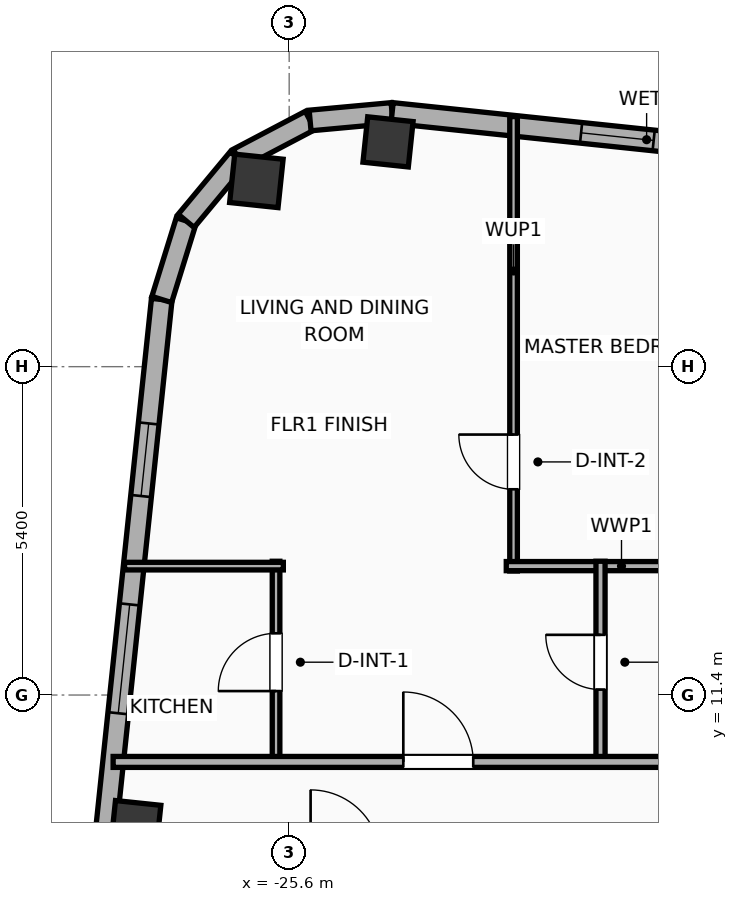
"""IFC4 building model, lengths in metres.
Left out: names, types, materials, properties, quantities, classifications, styles, units other than length and angle.
Written with IfcOpenShell. Run it as: python <this file> out.ifc"""

import sys

from ifc_helpers import new_model, si_unit, direction, frame, frame_2d, origin, origin_2d, place, context, subcontext, project, spatial, rectangle, hollow_rectangle, hollow_circle, extrude, element, fill, save


model = new_model("IFC4")
c1 = context("Model", 3, precision=1e-05, world=origin(), true_north=direction((0.0, 1.0)))
c2 = subcontext(c1, "Body", "Model", "MODEL_VIEW")
j1 = project(units=[si_unit("LENGTHUNIT", "METRE"), si_unit("PLANEANGLEUNIT", "RADIAN")], contexts=[c1])
p1 = place(None, origin())
s1 = spatial("IfcSite", under=j1, at=p1, CompositionType="ELEMENT")
p2 = place(p1, origin())
s2 = spatial("IfcBuilding", under=s1, at=p2, CompositionType="ELEMENT")
p3 = place(p2, frame((0.0, 0.0, 267.8)))
s3 = spatial("IfcBuildingStorey", under=s2, at=p3, CompositionType="ELEMENT", Elevation=267.8)
p4 = place(p3, frame((-23.975, 20.497, 0.0), z_axis=(0.0, 0.0, 1.0), x_axis=(0.994521895368, -0.104528463268, 0.0)))
e1 = element("IfcColumn", 1, at=p4, inside=s3, PredefinedType="COLUMN", context=c2, shape_type="SweptSolid", body=[
    extrude(hollow_rectangle(XDim=0.75, YDim=0.75, WallThickness=0.025, at=origin_2d()), origin(), (0.0, 0.0, 1.0), 3.9),
])
p5 = place(p3, frame((-26.139, 19.855, 0.0), z_axis=(0.0, 0.0, 1.0), x_axis=(0.994521895368, -0.104528463268, 0.0)))
e2 = element("IfcColumn", 2, at=p5, inside=s3, PredefinedType="COLUMN", context=c2, shape_type="SweptSolid", body=[
    extrude(hollow_circle(Radius=0.4, WallThickness=0.028, at=origin_2d()), origin(), (0.0, 0.0, 1.0), 3.9),
])
p6 = place(p3, frame((-28.123, 9.252, 0.0), z_axis=(0.0, 0.0, 1.0), x_axis=(0.994521895368, -0.104528463268, 0.0)))
e3 = element("IfcColumn", 3, at=p6, inside=s3, PredefinedType="COLUMN", context=c2, shape_type="SweptSolid", body=[
    extrude(hollow_rectangle(XDim=0.75, YDim=0.75, WallThickness=0.025, at=origin_2d()), origin(), (0.0, 0.0, 1.0), 3.9),
])
p7 = place(p3, frame((-30.87, -12.296, 0.0), z_axis=(0.0, 0.0, 1.0), x_axis=(0.104533282919, 0.994521388791, 0.0)))
e4 = element("IfcWall", 4, at=p7, inside=s3, PredefinedType="ELEMENTEDWALL", context=c2, shape_type="SweptSolid", body=[
    extrude(rectangle(XDim=30.366, YDim=0.34, at=frame_2d((15.183, 0.0))), origin(), (0.0, 0.0, 1.0), 3.65),
])
p8 = place(p7, frame((5.842, 0.0, 0.75)))
e5 = element("IfcOpeningElement", 5, at=p8, cuts=e4, PredefinedType="OPENING", context=c2, shape_type="SweptSolid", body=[
    extrude(rectangle(XDim=1.8, YDim=2.1, at=frame_2d((0.9, 1.05))), frame((0.0, 0.18, 0.0), z_axis=(0.0, -1.0, 0.0), x_axis=(1.0, 0.0, 0.0)), (0.0, 0.0, 1.0), 0.36),
])
p9 = place(p7, frame((23.525, 0.0, 0.75)))
e6 = element("IfcOpeningElement", 6, at=p9, cuts=e4, PredefinedType="OPENING", context=c2, shape_type="SweptSolid", body=[
    extrude(rectangle(XDim=1.8, YDim=2.1, at=frame_2d((0.9, 1.05))), frame((0.0, 0.18, 0.0), z_axis=(0.0, -1.0, 0.0), x_axis=(1.0, 0.0, 0.0)), (0.0, 0.0, 1.0), 0.36),
])
p10 = place(p7, frame((27.117, 0.0, 0.75)))
e7 = element("IfcOpeningElement", 7, at=p10, cuts=e4, PredefinedType="OPENING", context=c2, shape_type="SweptSolid", body=[
    extrude(rectangle(XDim=1.2, YDim=2.05, at=frame_2d((0.6, 1.025))), frame((0.0, 0.18, 0.0), z_axis=(0.0, -1.0, 0.0), x_axis=(1.0, 0.0, 0.0)), (0.0, 0.0, 1.0), 0.36),
])
p11 = place(p7, frame((16.235, 0.0, 0.75)))
e8 = element("IfcOpeningElement", 8, at=p11, cuts=e4, PredefinedType="OPENING", context=c2, shape_type="SweptSolid", body=[
    extrude(rectangle(XDim=1.2, YDim=2.05, at=frame_2d((0.6, 1.025))), frame((0.0, 0.18, 0.0), z_axis=(0.0, -1.0, 0.0), x_axis=(1.0, 0.0, 0.0)), (0.0, 0.0, 1.0), 0.36),
])
p12 = place(p3, frame((-27.696, 17.905, 0.0), z_axis=(0.0, 0.0, 1.0), x_axis=(0.296416228123, 0.955058856671, 0.0)))
e9 = element("IfcWall", 9, at=p12, inside=s3, PredefinedType="ELEMENTEDWALL", context=c2, shape_type="SweptSolid", body=[
    extrude(rectangle(XDim=1.354, YDim=0.34, at=frame_2d((0.677, 0.0))), origin(), (0.0, 0.0, 1.0), 3.65),
])
p13 = place(p3, frame((-27.294, 19.198, 0.0), z_axis=(0.0, 0.0, 1.0), x_axis=(0.639501603217, 0.768789762863, 0.0)))
e10 = element("IfcWall", 10, at=p13, inside=s3, PredefinedType="ELEMENTEDWALL", context=c2, shape_type="SweptSolid", body=[
    extrude(rectangle(XDim=1.337, YDim=0.34, at=frame_2d((0.668, 0.0))), origin(), (0.0, 0.0, 1.0), 3.65),
])
p14 = place(p3, frame((-26.439, 20.226, 0.0), z_axis=(0.0, 0.0, 1.0), x_axis=(0.884922182678, 0.465738908193, 0.0)))
e11 = element("IfcWall", 11, at=p14, inside=s3, PredefinedType="ELEMENTEDWALL", context=c2, shape_type="SweptSolid", body=[
    extrude(rectangle(XDim=1.337, YDim=0.34, at=frame_2d((0.668, 0.0))), origin(), (0.0, 0.0, 1.0), 3.65),
])
p15 = place(p3, frame((-25.256, 20.848, 0.0), z_axis=(0.0, 0.0, 1.0), x_axis=(0.995813013343, 0.091413579172, 0.0)))
e12 = element("IfcWall", 12, at=p15, inside=s3, PredefinedType="ELEMENTEDWALL", context=c2, shape_type="SweptSolid", body=[
    extrude(rectangle(XDim=1.354, YDim=0.34, at=frame_2d((0.677, 0.0))), origin(), (0.0, 0.0, 1.0), 3.65),
])
p16 = place(p3, frame((-23.908, 20.972, 0.0), z_axis=(0.0, 0.0, 1.0), x_axis=(0.994522285292, -0.104524753323, 0.0)))
e13 = element("IfcWall", 13, at=p16, inside=s3, PredefinedType="ELEMENTEDWALL", context=c2, shape_type="SweptSolid", body=[
    extrude(rectangle(XDim=8.418, YDim=0.34, at=frame_2d((4.209, 0.0))), origin(), (0.0, 0.0, 1.0), 3.65),
])
p17 = place(p16, frame((3.125, 0.0, 0.75)))
e14 = element("IfcOpeningElement", 14, at=p17, cuts=e13, PredefinedType="OPENING", context=c2, shape_type="SweptSolid", body=[
    extrude(rectangle(XDim=1.2, YDim=2.05, at=frame_2d((0.6, 1.025))), frame((0.0, 0.18, 0.0), z_axis=(0.0, -1.0, 0.0), x_axis=(1.0, 0.0, 0.0)), (0.0, 0.0, 1.0), 0.36),
])
p18 = place(p3, frame((-21.91, 13.44, 0.0), z_axis=(0.0, 0.0, 1.0), x_axis=(0.0, 1.0, 0.0)))
e15 = element("IfcWall", 15, at=p18, inside=s3, PredefinedType="PARTITIONING", context=c2, shape_type="SweptSolid", body=[
    extrude(rectangle(XDim=7.473, YDim=0.125, at=frame_2d((3.737, 0.0))), origin(), (0.0, 0.0, 1.0), 3.09),
])
p19 = place(p18, frame((1.344, 0.0, 0.0)))
e16 = element("IfcOpeningElement", 16, at=p19, cuts=e15, PredefinedType="OPENING", context=c2, shape_type="SweptSolid", body=[
    extrude(rectangle(XDim=0.9, YDim=2.05, at=frame_2d((0.45, 1.025))), frame((0.0, 0.073, 0.0), z_axis=(0.0, -1.0, 0.0), x_axis=(1.0, 0.0, 0.0)), (0.0, 0.0, 1.0), 0.145),
])
p20 = place(p3, frame((-22.03, 13.52, 0.0), z_axis=(0.0, 0.0, 1.0), x_axis=(1.0, 0.0, 0.0)))
e17 = element("IfcWall", 17, at=p20, inside=s3, PredefinedType="PLUMBINGWALL", context=c2, shape_type="SweptSolid", body=[
    extrude(rectangle(XDim=3.79, YDim=0.15, at=frame_2d((1.895, 0.0))), origin(), (0.0, 0.0, 1.0), 3.65),
])
p21 = place(p3, frame((-25.816, 10.28, 0.0), z_axis=(0.0, 0.0, 1.0), x_axis=(0.0, 1.0, 0.0)))
e18 = element("IfcWall", 18, at=p21, inside=s3, PredefinedType="PARTITIONING", context=c2, shape_type="SweptSolid", body=[
    extrude(rectangle(XDim=3.32, YDim=0.125, at=frame_2d((1.66, 0.0))), origin(), (0.0, 0.0, 1.0), 3.65),
])
p22 = place(p21, frame((1.185, 0.0, 0.0)))
e19 = element("IfcOpeningElement", 19, at=p22, cuts=e18, PredefinedType="OPENING", context=c2, shape_type="SweptSolid", body=[
    extrude(rectangle(XDim=0.95, YDim=2.05, at=frame_2d((0.475, 1.025))), frame((0.0, 0.073, 0.0), z_axis=(0.0, -1.0, 0.0), x_axis=(1.0, 0.0, 0.0)), (0.0, 0.0, 1.0), 0.145),
])
p23 = place(p3, frame((-28.308, 13.52, 0.0), z_axis=(0.0, 0.0, 1.0), x_axis=(1.0, 0.0, 0.0)))
e20 = element("IfcWall", 20, at=p23, inside=s3, PredefinedType="PARTITIONING", context=c2, shape_type="SweptSolid", body=[
    extrude(rectangle(XDim=2.612, YDim=0.125, at=frame_2d((1.306, 0.0))), origin(), (0.0, 0.0, 1.0), 3.65),
])
p24 = place(p3, frame((-20.48, 10.28, 0.0), z_axis=(0.0, 0.0, 1.0), x_axis=(0.0, 1.0, 0.0)))
e21 = element("IfcWall", 21, at=p24, inside=s3, PredefinedType="PLUMBINGWALL", context=c2, shape_type="SweptSolid", body=[
    extrude(rectangle(XDim=3.32, YDim=0.15, at=frame_2d((1.66, 0.0))), origin(), (0.0, 0.0, 1.0), 3.09),
])
p25 = place(p24, frame((1.21, 0.0, 0.0)))
e22 = element("IfcOpeningElement", 22, at=p25, cuts=e21, PredefinedType="OPENING", context=c2, shape_type="SweptSolid", body=[
    extrude(rectangle(XDim=0.9, YDim=2.05, at=frame_2d((0.45, 1.025))), frame((0.0, 0.085, 0.0), z_axis=(0.0, -1.0, 0.0), x_axis=(1.0, 0.0, 0.0)), (0.0, 0.0, 1.0), 0.17),
])
p26 = place(p3, frame((-28.495, 10.3, 0.0), z_axis=(0.0, 0.0, 1.0), x_axis=(1.0, 0.0, 0.0)))
e23 = element("IfcWall", 23, at=p26, inside=s3, PredefinedType="PARTITIONING", context=c2, shape_type="SweptSolid", body=[
    extrude(rectangle(XDim=53.956, YDim=0.18, at=frame_2d((26.978, 0.0))), origin(), (0.0, 0.0, 1.0), 3.65),
])
p27 = place(p26, frame((4.772, 0.0, 0.0)))
e24 = element("IfcOpeningElement", 24, at=p27, cuts=e23, PredefinedType="OPENING", context=c2, shape_type="SweptSolid", body=[
    extrude(rectangle(XDim=1.15, YDim=2.05, at=frame_2d((0.575, 1.025))), frame((0.0, 0.1, 0.0), z_axis=(0.0, -1.0, 0.0), x_axis=(1.0, 0.0, 0.0)), (0.0, 0.0, 1.0), 0.2),
])
p28 = place(p26, frame((13.185, 0.0, 0.0)))
e25 = element("IfcOpeningElement", 25, at=p28, cuts=e23, PredefinedType="OPENING", context=c2, shape_type="SweptSolid", body=[
    extrude(rectangle(XDim=0.9, YDim=2.05, at=frame_2d((0.45, 1.025))), frame((0.0, 0.1, 0.0), z_axis=(0.0, -1.0, 0.0), x_axis=(1.0, 0.0, 0.0)), (0.0, 0.0, 1.0), 0.2),
])
p29 = place(p26, frame((21.196, 0.0, 0.0)))
e26 = element("IfcOpeningElement", 26, at=p29, cuts=e23, PredefinedType="OPENING", context=c2, shape_type="SweptSolid", body=[
    extrude(rectangle(XDim=1.15, YDim=2.05, at=frame_2d((0.575, 1.025))), frame((0.0, 0.1, 0.0), z_axis=(0.0, -1.0, 0.0), x_axis=(1.0, 0.0, 0.0)), (0.0, 0.0, 1.0), 0.2),
])
p30 = place(p26, frame((28.194, 0.0, 0.0)))
e27 = element("IfcOpeningElement", 27, at=p30, cuts=e23, PredefinedType="OPENING", context=c2, shape_type="SweptSolid", body=[
    extrude(rectangle(XDim=1.15, YDim=2.05, at=frame_2d((0.575, 1.025))), frame((0.0, 0.1, 0.0), z_axis=(0.0, -1.0, 0.0), x_axis=(1.0, 0.0, 0.0)), (0.0, 0.0, 1.0), 0.2),
])
p31 = place(p26, frame((33.919, 0.0, 0.0)))
e28 = element("IfcOpeningElement", 28, at=p31, cuts=e23, PredefinedType="OPENING", context=c2, shape_type="SweptSolid", body=[
    extrude(rectangle(XDim=1.15, YDim=2.05, at=frame_2d((0.575, 1.025))), frame((0.0, 0.1, 0.0), z_axis=(0.0, -1.0, 0.0), x_axis=(1.0, 0.0, 0.0)), (0.0, 0.0, 1.0), 0.2),
])
p32 = place(p26, frame((41.182, 0.0, 0.0)))
e29 = element("IfcOpeningElement", 29, at=p32, cuts=e23, PredefinedType="OPENING", context=c2, shape_type="SweptSolid", body=[
    extrude(rectangle(XDim=0.9, YDim=2.05, at=frame_2d((0.45, 1.025))), frame((0.0, 0.1, 0.0), z_axis=(0.0, -1.0, 0.0), x_axis=(1.0, 0.0, 0.0)), (0.0, 0.0, 1.0), 0.2),
])
p33 = place(p26, frame((49.346, 0.0, 0.0)))
e30 = element("IfcOpeningElement", 30, at=p33, cuts=e23, PredefinedType="OPENING", context=c2, shape_type="SweptSolid", body=[
    extrude(rectangle(XDim=0.9, YDim=2.05, at=frame_2d((0.45, 1.025))), frame((0.0, 0.1, 0.0), z_axis=(0.0, -1.0, 0.0), x_axis=(1.0, 0.0, 0.0)), (0.0, 0.0, 1.0), 0.2),
])
p34 = place(p9, origin())
e31 = element("IfcWindow", 31, at=p34, inside=s3, PartitioningType="SINGLE_PANEL", PredefinedType="WINDOW", context=c2, shape_type="SweptSolid", body=[
    extrude(rectangle(XDim=1.8, YDim=2.1, at=frame_2d((0.9, 1.05))), frame((0.0, 0.03, 0.0), z_axis=(0.0, -1.0, 0.0), x_axis=(1.0, 0.0, 0.0)), (0.0, 0.0, 1.0), 0.06),
])
fill(e6, e31)
p35 = place(p10, origin())
e32 = element("IfcWindow", 32, at=p35, inside=s3, PartitioningType="SINGLE_PANEL", PredefinedType="WINDOW", context=c2, shape_type="SweptSolid", body=[
    extrude(rectangle(XDim=1.2, YDim=2.05, at=frame_2d((0.6, 1.025))), frame((0.0, 0.03, 0.0), z_axis=(0.0, -1.0, 0.0), x_axis=(1.0, 0.0, 0.0)), (0.0, 0.0, 1.0), 0.06),
])
fill(e7, e32)
p36 = place(p17, origin())
e33 = element("IfcWindow", 33, at=p36, inside=s3, PartitioningType="SINGLE_PANEL", PredefinedType="WINDOW", context=c2, shape_type="SweptSolid", body=[
    extrude(rectangle(XDim=1.2, YDim=2.05, at=frame_2d((0.6, 1.025))), frame((0.0, 0.03, 0.0), z_axis=(0.0, -1.0, 0.0), x_axis=(1.0, 0.0, 0.0)), (0.0, 0.0, 1.0), 0.06),
])
fill(e14, e33)
p37 = place(p19, origin())
e34 = element("IfcDoor", 34, at=p37, inside=s3, OperationType="SINGLE_SWING_RIGHT", PredefinedType="DOOR", context=c2, shape_type="SweptSolid", body=[
    extrude(rectangle(XDim=0.9, YDim=2.05, at=frame_2d((0.45, 1.025))), frame((0.0, 0.025, 0.0), z_axis=(0.0, -1.0, 0.0), x_axis=(1.0, 0.0, 0.0)), (0.0, 0.0, 1.0), 0.05),
])
fill(e16, e34)
p38 = place(p22, origin())
e35 = element("IfcDoor", 35, at=p38, inside=s3, OperationType="SINGLE_SWING_LEFT", PredefinedType="DOOR", context=c2, shape_type="SweptSolid", body=[
    extrude(rectangle(XDim=0.95, YDim=2.05, at=frame_2d((0.475, 1.025))), frame((0.0, 0.025, 0.0), z_axis=(0.0, -1.0, 0.0), x_axis=(1.0, 0.0, 0.0)), (0.0, 0.0, 1.0), 0.05),
])
fill(e19, e35)
p39 = place(p25, origin())
e36 = element("IfcDoor", 36, at=p39, inside=s3, OperationType="SINGLE_SWING_RIGHT", PredefinedType="DOOR", context=c2, shape_type="SweptSolid", body=[
    extrude(rectangle(XDim=0.9, YDim=2.05, at=frame_2d((0.45, 1.025))), frame((0.0, 0.025, 0.0), z_axis=(0.0, -1.0, 0.0), x_axis=(1.0, 0.0, 0.0)), (0.0, 0.0, 1.0), 0.05),
])
fill(e22, e36)
p40 = place(p27, origin())
e37 = element("IfcDoor", 37, at=p40, inside=s3, OperationType="SINGLE_SWING_LEFT", PredefinedType="DOOR", context=c2, shape_type="SweptSolid", body=[
    extrude(rectangle(XDim=1.15, YDim=2.05, at=frame_2d((0.575, 1.025))), frame((0.0, 0.025, 0.0), z_axis=(0.0, -1.0, 0.0), x_axis=(1.0, 0.0, 0.0)), (0.0, 0.0, 1.0), 0.05),
])
fill(e24, e37)
save(model, sys.argv[1])
